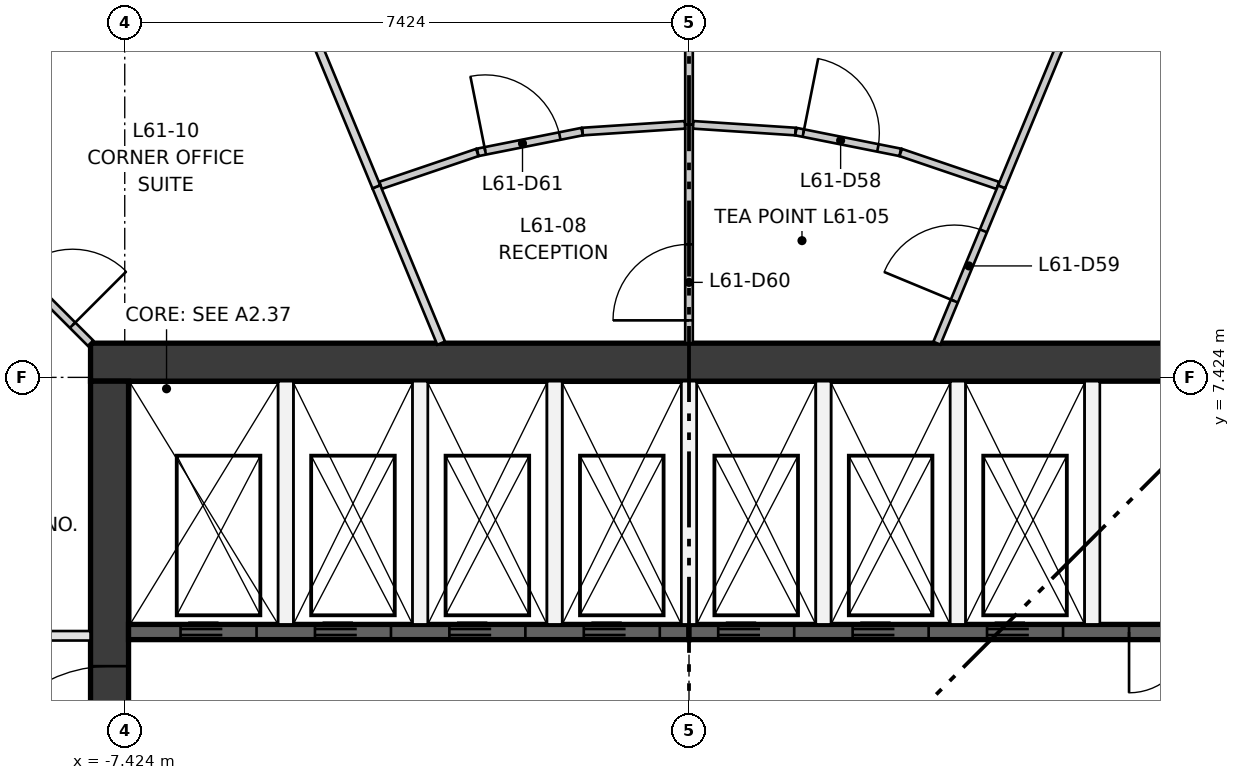
"""IFC4 building model, lengths in metres.
Left out: names, types, materials, properties, quantities, classifications, styles, units other than length and angle.
Written with IfcOpenShell. Run it as: python <this file> out.ifc"""

import sys

from ifc_helpers import new_model, si_unit, direction, frame, frame_2d, origin, place, context, subcontext, project, spatial, polyline, rectangle, outline, extrude, element, fill, save


model = new_model("IFC4")
c1 = context("Model", 3, precision=1e-05, world=origin(), true_north=direction((0.0, 1.0)))
c2 = subcontext(c1, "Body", "Model", "MODEL_VIEW")
j1 = project(units=[si_unit("LENGTHUNIT", "METRE"), si_unit("PLANEANGLEUNIT", "RADIAN")], contexts=[c1])
p1 = place(None, origin())
s1 = spatial("IfcSite", under=j1, at=p1, CompositionType="ELEMENT")
p2 = place(p1, origin())
s2 = spatial("IfcBuilding", under=s1, at=p2, CompositionType="ELEMENT")
p3 = place(p2, frame((0.0, 0.0, 224.5)))
s3 = spatial("IfcBuildingStorey", under=s2, at=p3, CompositionType="ELEMENT", Elevation=224.5)
p4 = place(p3, frame((-7.874, 7.624, 0.0), z_axis=(0.0, 0.0, 1.0), x_axis=(1.0, 0.0, 0.0)))
e1 = element("IfcWall", 1, at=p4, inside=s3, PredefinedType="SHEAR", context=c2, shape_type="SweptSolid", body=[
    extrude(rectangle(XDim=15.748, YDim=0.5, at=frame_2d((7.874, 0.0))), origin(), (0.0, 0.0, 1.0), 3.35),
])
p5 = place(p3, frame((-7.624, -7.374, 0.0), z_axis=(0.0, 0.0, 1.0), x_axis=(0.0, 1.0, 0.0)))
e2 = element("IfcWall", 2, at=p5, inside=s3, PredefinedType="SHEAR", context=c2, shape_type="SweptSolid", body=[
    extrude(rectangle(XDim=14.748, YDim=0.5, at=frame_2d((7.374, 0.0))), origin(), (0.0, 0.0, 1.0), 3.35),
])
p6 = place(p5, frame((6.874, 0.0, 0.0)))
e3 = element("IfcOpeningElement", 3, at=p6, cuts=e2, PredefinedType="OPENING", context=c2, shape_type="SweptSolid", body=[
    extrude(rectangle(XDim=1.0, YDim=2.1, at=frame_2d((0.5, 1.05))), frame((0.0, 0.26, 0.0), z_axis=(0.0, -1.0, 0.0), x_axis=(1.0, 0.0, 0.0)), (0.0, 0.0, 1.0), 0.52),
])
p7 = place(p5, frame((3.75, 0.0, 0.0)))
e4 = element("IfcOpeningElement", 4, at=p7, cuts=e2, PredefinedType="OPENING", context=c2, shape_type="SweptSolid", body=[
    extrude(rectangle(XDim=1.8, YDim=2.1, at=frame_2d((0.9, 1.05))), frame((0.0, 0.26, 0.0), z_axis=(0.0, -1.0, 0.0), x_axis=(1.0, 0.0, 0.0)), (0.0, 0.0, 1.0), 0.52),
])
p8 = place(p5, frame((9.198, 0.0, 0.0)))
e5 = element("IfcOpeningElement", 5, at=p8, cuts=e2, PredefinedType="OPENING", context=c2, shape_type="SweptSolid", body=[
    extrude(rectangle(XDim=1.8, YDim=2.1, at=frame_2d((0.9, 1.05))), frame((0.0, 0.26, 0.0), z_axis=(0.0, -1.0, 0.0), x_axis=(1.0, 0.0, 0.0)), (0.0, 0.0, 1.0), 0.52),
])
p9 = place(p3, frame((-7.374, 4.074, 0.0), z_axis=(0.0, 0.0, 1.0), x_axis=(1.0, 0.0, 0.0)))
e6 = element("IfcWall", 6, at=p9, inside=s3, PredefinedType="SHEAR", context=c2, shape_type="SweptSolid", body=[
    extrude(rectangle(XDim=7.374, YDim=0.2, at=frame_2d((3.687, 0.0))), origin(), (0.0, 0.0, 1.0), 3.0),
])
p10 = place(p9, frame((0.684, 0.0, 0.0)))
e7 = element("IfcOpeningElement", 7, at=p10, cuts=e6, PredefinedType="OPENING", context=c2, shape_type="SweptSolid", body=[
    extrude(rectangle(XDim=1.0, YDim=2.1, at=frame_2d((0.5, 1.05))), frame((0.0, 0.11, 0.0), z_axis=(0.0, -1.0, 0.0), x_axis=(1.0, 0.0, 0.0)), (0.0, 0.0, 1.0), 0.22),
])
p11 = place(p9, frame((2.453, 0.0, 0.0)))
e8 = element("IfcOpeningElement", 8, at=p11, cuts=e6, PredefinedType="OPENING", context=c2, shape_type="SweptSolid", body=[
    extrude(rectangle(XDim=1.0, YDim=2.1, at=frame_2d((0.5, 1.05))), frame((0.0, 0.11, 0.0), z_axis=(0.0, -1.0, 0.0), x_axis=(1.0, 0.0, 0.0)), (0.0, 0.0, 1.0), 0.22),
])
p12 = place(p9, frame((4.221, 0.0, 0.0)))
e9 = element("IfcOpeningElement", 9, at=p12, cuts=e6, PredefinedType="OPENING", context=c2, shape_type="SweptSolid", body=[
    extrude(rectangle(XDim=1.0, YDim=2.1, at=frame_2d((0.5, 1.05))), frame((0.0, 0.11, 0.0), z_axis=(0.0, -1.0, 0.0), x_axis=(1.0, 0.0, 0.0)), (0.0, 0.0, 1.0), 0.22),
])
p13 = place(p9, frame((5.99, 0.0, 0.0)))
e10 = element("IfcOpeningElement", 10, at=p13, cuts=e6, PredefinedType="OPENING", context=c2, shape_type="SweptSolid", body=[
    extrude(rectangle(XDim=1.0, YDim=2.1, at=frame_2d((0.5, 1.05))), frame((0.0, 0.11, 0.0), z_axis=(0.0, -1.0, 0.0), x_axis=(1.0, 0.0, 0.0)), (0.0, 0.0, 1.0), 0.22),
])
p14 = place(p3, frame((0.0, 4.074, 0.0), z_axis=(0.0, 0.0, 1.0), x_axis=(1.0, 0.0, 0.0)))
e11 = element("IfcWall", 11, at=p14, inside=s3, PredefinedType="SHEAR", context=c2, shape_type="SweptSolid", body=[
    extrude(rectangle(XDim=7.374, YDim=0.2, at=frame_2d((3.687, 0.0))), origin(), (0.0, 0.0, 1.0), 3.0),
])
p15 = place(p14, frame((0.384, 0.0, 0.0)))
e12 = element("IfcOpeningElement", 12, at=p15, cuts=e11, PredefinedType="OPENING", context=c2, shape_type="SweptSolid", body=[
    extrude(rectangle(XDim=1.0, YDim=2.1, at=frame_2d((0.5, 1.05))), frame((0.0, 0.11, 0.0), z_axis=(0.0, -1.0, 0.0), x_axis=(1.0, 0.0, 0.0)), (0.0, 0.0, 1.0), 0.22),
])
p16 = place(p14, frame((2.153, 0.0, 0.0)))
e13 = element("IfcOpeningElement", 13, at=p16, cuts=e11, PredefinedType="OPENING", context=c2, shape_type="SweptSolid", body=[
    extrude(rectangle(XDim=1.0, YDim=2.1, at=frame_2d((0.5, 1.05))), frame((0.0, 0.11, 0.0), z_axis=(0.0, -1.0, 0.0), x_axis=(1.0, 0.0, 0.0)), (0.0, 0.0, 1.0), 0.22),
])
p17 = place(p14, frame((3.921, 0.0, 0.0)))
e14 = element("IfcOpeningElement", 14, at=p17, cuts=e11, PredefinedType="OPENING", context=c2, shape_type="SweptSolid", body=[
    extrude(rectangle(XDim=1.0, YDim=2.1, at=frame_2d((0.5, 1.05))), frame((0.0, 0.11, 0.0), z_axis=(0.0, -1.0, 0.0), x_axis=(1.0, 0.0, 0.0)), (0.0, 0.0, 1.0), 0.22),
])
p18 = place(p14, frame((5.79, 0.0, 0.0)))
e15 = element("IfcOpeningElement", 15, at=p18, cuts=e11, PredefinedType="OPENING", context=c2, shape_type="SweptSolid", body=[
    extrude(rectangle(XDim=0.8, YDim=2.1, at=frame_2d((0.4, 1.05))), frame((0.0, 0.11, 0.0), z_axis=(0.0, -1.0, 0.0), x_axis=(1.0, 0.0, 0.0)), (0.0, 0.0, 1.0), 0.22),
])
for number, where, z_axis, x_axis in (
    (16, (-5.305, 4.174, 0.0), (0.0, 0.0, 1.0), (0.0, 1.0, 0.0)),
    (17, (-3.537, 4.174, 0.0), (0.0, 0.0, 1.0), (0.0, 1.0, 0.0)),
    (18, (-1.769, 4.174, 0.0), (0.0, 0.0, 1.0), (0.0, 1.0, 0.0)),
    (19, (0.0, 4.174, 0.0), (0.0, 0.0, 1.0), (0.0, 1.0, 0.0)),
    (20, (1.769, 4.174, 0.0), (0.0, 0.0, 1.0), (0.0, 1.0, 0.0)),
    (21, (3.537, 4.174, 0.0), (0.0, 0.0, 1.0), (0.0, 1.0, 0.0)),
    (22, (5.305, 4.174, 0.0), (0.0, 0.0, 1.0), (0.0, 1.0, 0.0)),
):
    element("IfcWall", number, at=place(p3, frame(where, z_axis=z_axis, x_axis=x_axis)), inside=s3, PredefinedType="PARTITIONING", context=c2, shape_type="SweptSolid", body=[
        extrude(rectangle(XDim=3.2, YDim=0.2, at=frame_2d((1.6, 0.0))), origin(), (0.0, 0.0, 1.0), 3.0),
    ])
p19 = place(p3, frame((-8.643, 12.934, 0.0), z_axis=(-0.619832994913, 0.755344730477, 0.212747259813), x_axis=(-0.77304293478, -0.634353703321, -8.415613e-06)))
e23 = element("IfcWall", 23, at=p19, inside=s3, PredefinedType="SOLIDWALL", context=c2, shape_type="SweptSolid", body=[
    extrude(outline(polyline([(0.0, 0.0), (2.594, 0.0), (2.575, 0.921), (0.019, 0.921), (0.0, 0.0)])), origin(), (0.0, 0.0, -1.0), 0.3),
])
p20 = place(p3, frame((-10.296, 4.024, 0.0), z_axis=(0.0, 0.0, 1.0), x_axis=(1.0, 0.0, 0.0)))
e24 = element("IfcWall", 24, at=p20, inside=s3, PredefinedType="PARTITIONING", context=c2, shape_type="SweptSolid", body=[
    extrude(rectangle(XDim=2.422, YDim=0.125, at=frame_2d((1.211, 0.0))), origin(), (0.0, 0.0, 1.0), 3.0),
])
p21 = place(p20, frame((0.7, 0.0, 0.0)))
e25 = element("IfcOpeningElement", 25, at=p21, cuts=e24, PredefinedType="OPENING", context=c2, shape_type="SweptSolid", body=[
    extrude(rectangle(XDim=1.0, YDim=2.1, at=frame_2d((0.5, 1.05))), frame((0.0, 0.073, 0.0), z_axis=(0.0, -1.0, 0.0), x_axis=(1.0, 0.0, 0.0)), (0.0, 0.0, 1.0), 0.145),
])
p22 = place(p3, frame((0.053, 10.747, 0.0), z_axis=(0.0, 0.0, 1.0), x_axis=(0.99785346224, -0.06548639473, 0.0)))
e26 = element("IfcWall", 26, at=p22, inside=s3, PredefinedType="PARTITIONING", context=c2, shape_type="SweptSolid", body=[
    extrude(rectangle(XDim=1.35, YDim=0.1, at=frame_2d((0.675, 0.0))), origin(), (0.0, 0.0, 1.0), 3.0),
])
p23 = place(p3, frame((1.406, 10.657, 0.0), z_axis=(0.0, 0.0, 1.0), x_axis=(0.980761417594, -0.19521025014, 0.0)))
e27 = element("IfcWall", 27, at=p23, inside=s3, PredefinedType="PARTITIONING", context=c2, shape_type="SweptSolid", body=[
    extrude(rectangle(XDim=1.399, YDim=0.1, at=frame_2d((0.7, 0.0))), origin(), (0.0, 0.0, 1.0), 3.0),
])
p24 = place(p23, frame((0.1, 0.0, 0.0)))
e28 = element("IfcOpeningElement", 28, at=p24, cuts=e27, PredefinedType="OPENING", context=c2, shape_type="SweptSolid", body=[
    extrude(rectangle(XDim=1.0, YDim=2.1, at=frame_2d((0.5, 1.05))), frame((0.0, 0.06, 0.0), z_axis=(0.0, -1.0, 0.0), x_axis=(1.0, 0.0, 0.0)), (0.0, 0.0, 1.0), 0.12),
])
p25 = place(p3, frame((2.785, 10.383, 0.0), z_axis=(0.0, 0.0, 1.0), x_axis=(0.946968869726, -0.32132531766, 0.0)))
e29 = element("IfcWall", 29, at=p25, inside=s3, PredefinedType="PARTITIONING", context=c2, shape_type="SweptSolid", body=[
    extrude(rectangle(XDim=1.349, YDim=0.1, at=frame_2d((0.675, 0.0))), origin(), (0.0, 0.0, 1.0), 3.0),
])
p26 = place(p3, frame((3.261, 7.874, 0.0), z_axis=(0.0, 0.0, 1.0), x_axis=(0.382684189911, 0.923879218725, 0.0)))
e30 = element("IfcWall", 30, at=p26, inside=s3, PredefinedType="PARTITIONING", context=c2, shape_type="SweptSolid", body=[
    extrude(rectangle(XDim=2.227, YDim=0.1, at=frame_2d((1.114, 0.0))), origin(), (0.0, 0.0, 1.0), 3.0),
])
p27 = place(p26, frame((0.6, 0.0, 0.0)))
e31 = element("IfcOpeningElement", 31, at=p27, cuts=e30, PredefinedType="OPENING", context=c2, shape_type="SweptSolid", body=[
    extrude(rectangle(XDim=1.0, YDim=2.1, at=frame_2d((0.5, 1.05))), frame((0.0, 0.06, 0.0), z_axis=(0.0, -1.0, 0.0), x_axis=(1.0, 0.0, 0.0)), (0.0, 0.0, 1.0), 0.12),
])
p28 = place(p3, frame((0.0, 7.874, 0.0), z_axis=(0.0, 0.0, 1.0), x_axis=(0.0, 1.0, 0.0)))
e32 = element("IfcWall", 32, at=p28, inside=s3, PredefinedType="PARTITIONING", context=c2, shape_type="SweptSolid", body=[
    extrude(rectangle(XDim=2.876, YDim=0.1, at=frame_2d((1.438, 0.0))), origin(), (0.0, 0.0, 1.0), 3.0),
])
p29 = place(p28, frame((0.3, 0.0, 0.0)))
e33 = element("IfcOpeningElement", 33, at=p29, cuts=e32, PredefinedType="OPENING", context=c2, shape_type="SweptSolid", body=[
    extrude(rectangle(XDim=1.0, YDim=2.1, at=frame_2d((0.5, 1.05))), frame((0.0, 0.06, 0.0), z_axis=(0.0, -1.0, 0.0), x_axis=(1.0, 0.0, 0.0)), (0.0, 0.0, 1.0), 0.12),
])
for number, where, z_axis, x_axis in (
    (34, (5.346, 12.906, 0.0), (0.0, 0.0, 1.0), (-0.383, -0.924, 0.0)),
    (35, (0.0, 10.75, 0.0), (0.0, 0.0, 1.0), (0.0, 1.0, 0.0)),
):
    element("IfcWall", number, at=place(p3, frame(where, z_axis=z_axis, x_axis=x_axis)), inside=s3, PredefinedType="PARTITIONING", context=c2, shape_type="SweptSolid", body=[
        extrude(rectangle(XDim=3.22, YDim=0.1, at=frame_2d((1.61, 0.0))), origin(), (0.0, 0.0, 1.0), 3.0),
    ])
p30 = place(p3, frame((-4.059, 9.95, 0.0), z_axis=(0.0, 0.0, 1.0), x_axis=(0.946944164887, 0.321398115407, 0.0)))
e36 = element("IfcWall", 36, at=p30, inside=s3, PredefinedType="PARTITIONING", context=c2, shape_type="SweptSolid", body=[
    extrude(rectangle(XDim=1.344, YDim=0.1, at=frame_2d((0.672, 0.0))), origin(), (0.0, 0.0, 1.0), 3.0),
])
p31 = place(p3, frame((-2.779, 10.384, 0.0), z_axis=(0.0, 0.0, 1.0), x_axis=(0.980761417594, 0.19521025014, 0.0)))
e37 = element("IfcWall", 37, at=p31, inside=s3, PredefinedType="PARTITIONING", context=c2, shape_type="SweptSolid", body=[
    extrude(rectangle(XDim=1.399, YDim=0.1, at=frame_2d((0.7, 0.0))), origin(), (0.0, 0.0, 1.0), 3.0),
])
p32 = place(p31, frame((0.1, 0.0, 0.0)))
e38 = element("IfcOpeningElement", 38, at=p32, cuts=e37, PredefinedType="OPENING", context=c2, shape_type="SweptSolid", body=[
    extrude(rectangle(XDim=1.0, YDim=2.1, at=frame_2d((0.5, 1.05))), frame((0.0, 0.06, 0.0), z_axis=(0.0, -1.0, 0.0), x_axis=(1.0, 0.0, 0.0)), (0.0, 0.0, 1.0), 0.12),
])
p33 = place(p3, frame((-1.4, 10.658, 0.0), z_axis=(0.0, 0.0, 1.0), x_axis=(0.99785346224, 0.06548639473, 0.0)))
e39 = element("IfcWall", 39, at=p33, inside=s3, PredefinedType="PARTITIONING", context=c2, shape_type="SweptSolid", body=[
    extrude(rectangle(XDim=1.35, YDim=0.1, at=frame_2d((0.675, 0.0))), origin(), (0.0, 0.0, 1.0), 3.0),
])
p34 = place(p3, frame((-3.261, 7.874, 0.0), z_axis=(0.0, 0.0, 1.0), x_axis=(-0.382684189911, 0.923879218725, 0.0)))
e40 = element("IfcWall", 40, at=p34, inside=s3, PredefinedType="PARTITIONING", context=c2, shape_type="SweptSolid", body=[
    extrude(rectangle(XDim=2.227, YDim=0.11, at=frame_2d((1.114, 0.0))), origin(), (0.0, 0.0, 1.0), 3.0),
])
p35 = place(p3, frame((-4.114, 9.932, 0.0), z_axis=(0.0, 0.0, 1.0), x_axis=(-0.382735705454, 0.923857878556, 0.0)))
e41 = element("IfcWall", 41, at=p35, inside=s3, PredefinedType="PARTITIONING", context=c2, shape_type="SweptSolid", body=[
    extrude(rectangle(XDim=3.22, YDim=0.11, at=frame_2d((1.61, 0.0))), origin(), (0.0, 0.0, 1.0), 3.0),
])
p36 = place(p3, frame((-9.878, 9.878, 0.0), z_axis=(0.0, 0.0, 1.0), x_axis=(0.707106781187, -0.707106781187, 0.0)))
e42 = element("IfcWall", 42, at=p36, inside=s3, PredefinedType="PARTITIONING", context=c2, shape_type="SweptSolid", body=[
    extrude(rectangle(XDim=2.835, YDim=0.1, at=frame_2d((1.417, 0.0))), origin(), (0.0, 0.0, 1.0), 3.0),
])
p37 = place(p36, frame((1.5, 0.0, 0.0)))
e43 = element("IfcOpeningElement", 43, at=p37, cuts=e42, PredefinedType="OPENING", context=c2, shape_type="SweptSolid", body=[
    extrude(rectangle(XDim=1.0, YDim=2.1, at=frame_2d((0.5, 1.05))), frame((0.0, 0.06, 0.0), z_axis=(0.0, -1.0, 0.0), x_axis=(1.0, 0.0, 0.0)), (0.0, 0.0, 1.0), 0.12),
])
p38 = place(p10, frame((1.0, 0.0, 0.0), z_axis=(0.0, 0.0, 1.0), x_axis=(-1.0, 0.0, 0.0)))
e44 = element("IfcDoor", 44, at=p38, inside=s3, OperationType="DOUBLE_DOOR_SLIDING", PredefinedType="DOOR", context=c2, shape_type="SweptSolid", body=[
    extrude(rectangle(XDim=1.0, YDim=2.1, at=frame_2d((0.5, 1.05))), frame((0.0, 0.025, 0.0), z_axis=(0.0, -1.0, 0.0), x_axis=(1.0, 0.0, 0.0)), (0.0, 0.0, 1.0), 0.05),
])
fill(e7, e44)
p39 = place(p11, frame((1.0, 0.0, 0.0), z_axis=(0.0, 0.0, 1.0), x_axis=(-1.0, 0.0, 0.0)))
e45 = element("IfcDoor", 45, at=p39, inside=s3, OperationType="DOUBLE_DOOR_SLIDING", PredefinedType="DOOR", context=c2, shape_type="SweptSolid", body=[
    extrude(rectangle(XDim=1.0, YDim=2.1, at=frame_2d((0.5, 1.05))), frame((0.0, 0.025, 0.0), z_axis=(0.0, -1.0, 0.0), x_axis=(1.0, 0.0, 0.0)), (0.0, 0.0, 1.0), 0.05),
])
fill(e8, e45)
p40 = place(p12, frame((1.0, 0.0, 0.0), z_axis=(0.0, 0.0, 1.0), x_axis=(-1.0, 0.0, 0.0)))
e46 = element("IfcDoor", 46, at=p40, inside=s3, OperationType="DOUBLE_DOOR_SLIDING", PredefinedType="DOOR", context=c2, shape_type="SweptSolid", body=[
    extrude(rectangle(XDim=1.0, YDim=2.1, at=frame_2d((0.5, 1.05))), frame((0.0, 0.025, 0.0), z_axis=(0.0, -1.0, 0.0), x_axis=(1.0, 0.0, 0.0)), (0.0, 0.0, 1.0), 0.05),
])
fill(e9, e46)
p41 = place(p13, frame((1.0, 0.0, 0.0), z_axis=(0.0, 0.0, 1.0), x_axis=(-1.0, 0.0, 0.0)))
e47 = element("IfcDoor", 47, at=p41, inside=s3, OperationType="DOUBLE_DOOR_SLIDING", PredefinedType="DOOR", context=c2, shape_type="SweptSolid", body=[
    extrude(rectangle(XDim=1.0, YDim=2.1, at=frame_2d((0.5, 1.05))), frame((0.0, 0.025, 0.0), z_axis=(0.0, -1.0, 0.0), x_axis=(1.0, 0.0, 0.0)), (0.0, 0.0, 1.0), 0.05),
])
fill(e10, e47)
p42 = place(p15, frame((1.0, 0.0, 0.0), z_axis=(0.0, 0.0, 1.0), x_axis=(-1.0, 0.0, 0.0)))
e48 = element("IfcDoor", 48, at=p42, inside=s3, OperationType="DOUBLE_DOOR_SLIDING", PredefinedType="DOOR", context=c2, shape_type="SweptSolid", body=[
    extrude(rectangle(XDim=1.0, YDim=2.1, at=frame_2d((0.5, 1.05))), frame((0.0, 0.025, 0.0), z_axis=(0.0, -1.0, 0.0), x_axis=(1.0, 0.0, 0.0)), (0.0, 0.0, 1.0), 0.05),
])
fill(e12, e48)
p43 = place(p16, frame((1.0, 0.0, 0.0), z_axis=(0.0, 0.0, 1.0), x_axis=(-1.0, 0.0, 0.0)))
e49 = element("IfcDoor", 49, at=p43, inside=s3, OperationType="DOUBLE_DOOR_SLIDING", PredefinedType="DOOR", context=c2, shape_type="SweptSolid", body=[
    extrude(rectangle(XDim=1.0, YDim=2.1, at=frame_2d((0.5, 1.05))), frame((0.0, 0.025, 0.0), z_axis=(0.0, -1.0, 0.0), x_axis=(1.0, 0.0, 0.0)), (0.0, 0.0, 1.0), 0.05),
])
fill(e13, e49)
p44 = place(p17, frame((1.0, 0.0, 0.0), z_axis=(0.0, 0.0, 1.0), x_axis=(-1.0, 0.0, 0.0)))
e50 = element("IfcDoor", 50, at=p44, inside=s3, OperationType="DOUBLE_DOOR_SLIDING", PredefinedType="DOOR", context=c2, shape_type="SweptSolid", body=[
    extrude(rectangle(XDim=1.0, YDim=2.1, at=frame_2d((0.5, 1.05))), frame((0.0, 0.025, 0.0), z_axis=(0.0, -1.0, 0.0), x_axis=(1.0, 0.0, 0.0)), (0.0, 0.0, 1.0), 0.05),
])
fill(e14, e50)
p45 = place(p18, frame((0.8, 0.0, 0.0), z_axis=(0.0, 0.0, 1.0), x_axis=(-1.0, 0.0, 0.0)))
e51 = element("IfcDoor", 51, at=p45, inside=s3, OperationType="SINGLE_SWING_LEFT", PredefinedType="DOOR", context=c2, shape_type="SweptSolid", body=[
    extrude(rectangle(XDim=0.8, YDim=2.1, at=frame_2d((0.4, 1.05))), frame((0.0, 0.025, 0.0), z_axis=(0.0, -1.0, 0.0), x_axis=(1.0, 0.0, 0.0)), (0.0, 0.0, 1.0), 0.05),
])
fill(e15, e51)
p46 = place(p8, origin())
e52 = element("IfcDoor", 52, at=p46, inside=s3, OperationType="DOUBLE_DOOR_SINGLE_SWING", PredefinedType="DOOR", context=c2, shape_type="SweptSolid", body=[
    extrude(rectangle(XDim=1.8, YDim=2.1, at=frame_2d((0.9, 1.05))), frame((0.0, 0.025, 0.0), z_axis=(0.0, -1.0, 0.0), x_axis=(1.0, 0.0, 0.0)), (0.0, 0.0, 1.0), 0.05),
])
fill(e5, e52)
p47 = place(p24, origin())
e53 = element("IfcDoor", 53, at=p47, inside=s3, OperationType="SINGLE_SWING_LEFT", PredefinedType="DOOR", context=c2, shape_type="SweptSolid", body=[
    extrude(rectangle(XDim=1.0, YDim=2.1, at=frame_2d((0.5, 1.05))), frame((0.0, 0.025, 0.0), z_axis=(0.0, -1.0, 0.0), x_axis=(1.0, 0.0, 0.0)), (0.0, 0.0, 1.0), 0.05),
])
fill(e28, e53)
p48 = place(p27, origin())
e54 = element("IfcDoor", 54, at=p48, inside=s3, OperationType="SINGLE_SWING_LEFT", PredefinedType="DOOR", context=c2, shape_type="SweptSolid", body=[
    extrude(rectangle(XDim=1.0, YDim=2.1, at=frame_2d((0.5, 1.05))), frame((0.0, 0.025, 0.0), z_axis=(0.0, -1.0, 0.0), x_axis=(1.0, 0.0, 0.0)), (0.0, 0.0, 1.0), 0.05),
])
fill(e31, e54)
p49 = place(p29, origin())
e55 = element("IfcDoor", 55, at=p49, inside=s3, OperationType="SINGLE_SWING_LEFT", PredefinedType="DOOR", context=c2, shape_type="SweptSolid", body=[
    extrude(rectangle(XDim=1.0, YDim=2.1, at=frame_2d((0.5, 1.05))), frame((0.0, 0.025, 0.0), z_axis=(0.0, -1.0, 0.0), x_axis=(1.0, 0.0, 0.0)), (0.0, 0.0, 1.0), 0.05),
])
fill(e33, e55)
p50 = place(p32, origin())
e56 = element("IfcDoor", 56, at=p50, inside=s3, OperationType="SINGLE_SWING_LEFT", PredefinedType="DOOR", context=c2, shape_type="SweptSolid", body=[
    extrude(rectangle(XDim=1.0, YDim=2.1, at=frame_2d((0.5, 1.05))), frame((0.0, 0.025, 0.0), z_axis=(0.0, -1.0, 0.0), x_axis=(1.0, 0.0, 0.0)), (0.0, 0.0, 1.0), 0.05),
])
fill(e38, e56)
p51 = place(p37, origin())
e57 = element("IfcDoor", 57, at=p51, inside=s3, OperationType="SINGLE_SWING_RIGHT", PredefinedType="DOOR", context=c2, shape_type="SweptSolid", body=[
    extrude(rectangle(XDim=1.0, YDim=2.1, at=frame_2d((0.5, 1.05))), frame((0.0, 0.025, 0.0), z_axis=(0.0, -1.0, 0.0), x_axis=(1.0, 0.0, 0.0)), (0.0, 0.0, 1.0), 0.05),
])
fill(e43, e57)
save(model, sys.argv[1])
